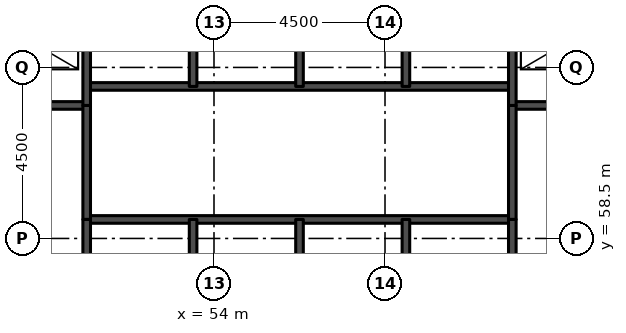
"""IFC4 building model, lengths in metres.
Left out: names, types, materials, properties, quantities, classifications, styles, units other than length and angle.
Written with IfcOpenShell. Run it as: python <this file> out.ifc"""

import sys

from ifc_helpers import new_model, si_unit, direction, frame, frame_2d, origin, place, context, subcontext, project, spatial, rectangle, extrude, element, save


model = new_model("IFC4")
c1 = context("Model", 3, precision=1e-05, world=origin(), true_north=direction((0.0, 1.0)))
c2 = subcontext(c1, "Body", "Model", "MODEL_VIEW")
j1 = project(units=[si_unit("LENGTHUNIT", "METRE"), si_unit("PLANEANGLEUNIT", "RADIAN")], contexts=[c1])
p1 = place(None, origin())
s1 = spatial("IfcSite", under=j1, at=p1, CompositionType="ELEMENT")
p2 = place(p1, origin())
s2 = spatial("IfcBuilding", under=s1, at=p2, CompositionType="ELEMENT")
p3 = place(p2, frame((0.0, 0.0, 42.9)))
s3 = spatial("IfcBuildingStorey", under=s2, at=p3, CompositionType="ELEMENT", Elevation=42.9)
p4 = place(p3, frame((50.65, 59.0, 0.0), z_axis=(0.0, 0.0, 1.0), x_axis=(1.0, 0.0, 0.0)))
e1 = element("IfcWall", 1, at=p4, inside=s3, PredefinedType="SOLIDWALL", context=c2, shape_type="SweptSolid", body=[
    extrude(rectangle(XDim=11.2, YDim=0.2, at=frame_2d((5.6, 0.0))), origin(), (0.0, 0.0, 1.0), 3.3),
])
for number, where, z_axis, x_axis in (
    (2, (45.5, 62.0, 0.0), (0.0, 0.0, 1.0), (1.0, 0.0, 0.0)),
    (3, (61.85, 62.0, 0.0), (0.0, 0.0, 1.0), (1.0, 0.0, 0.0)),
):
    element("IfcWall", number, at=place(p3, frame(where, z_axis=z_axis, x_axis=x_axis)), inside=s3, PredefinedType="SOLIDWALL", context=c2, shape_type="SweptSolid", body=[
        extrude(rectangle(XDim=5.15, YDim=0.2, at=frame_2d((2.575, 0.0))), origin(), (0.0, 0.0, 1.0), 3.08),
    ])
p5 = place(p3, frame((50.65, 62.5, 0.0), z_axis=(0.0, 0.0, 1.0), x_axis=(1.0, 0.0, 0.0)))
e4 = element("IfcWall", 4, at=p5, inside=s3, PredefinedType="SOLIDWALL", context=c2, shape_type="SweptSolid", body=[
    extrude(rectangle(XDim=11.2, YDim=0.2, at=frame_2d((5.6, 0.0))), origin(), (0.0, 0.0, 1.0), 3.3),
])
p6 = place(p3, frame((50.65, 59.0, 0.0), z_axis=(0.0, 0.0, 1.0), x_axis=(0.0, 1.0, 0.0)))
e5 = element("IfcWall", 5, at=p6, inside=s3, PredefinedType="SOLIDWALL", context=c2, shape_type="SweptSolid", body=[
    extrude(rectangle(XDim=3.0, YDim=0.2, at=frame_2d((1.5, 0.0))), origin(), (0.0, 0.0, 1.0), 3.3),
])
p7 = place(p3, frame((50.65, 56.2, 0.0), z_axis=(0.0, 0.0, 1.0), x_axis=(0.0, 1.0, 0.0)))
e6 = element("IfcWall", 6, at=p7, inside=s3, PredefinedType="SOLIDWALL", context=c2, shape_type="SweptSolid", body=[
    extrude(rectangle(XDim=2.8, YDim=0.2, at=frame_2d((1.4, 0.0))), origin(), (0.0, 0.0, 1.0), 3.08),
])
p8 = place(p3, frame((50.65, 62.0, 0.0), z_axis=(0.0, 0.0, 1.0), x_axis=(0.0, 1.0, 0.0)))
e7 = element("IfcWall", 7, at=p8, inside=s3, PredefinedType="SOLIDWALL", context=c2, shape_type="SweptSolid", body=[
    extrude(rectangle(XDim=3.3, YDim=0.2, at=frame_2d((1.65, 0.0))), origin(), (0.0, 0.0, 1.0), 3.08),
])
for number, where, z_axis, x_axis in (
    (8, (53.45, 56.2, 0.0), (0.0, 0.0, 1.0), (0.0, 1.0, 0.0)),
    (9, (53.45, 62.5, 0.0), (0.0, 0.0, 1.0), (0.0, 1.0, 0.0)),
    (10, (56.25, 56.2, 0.0), (0.0, 0.0, 1.0), (0.0, 1.0, 0.0)),
    (11, (56.25, 62.5, 0.0), (0.0, 0.0, 1.0), (0.0, 1.0, 0.0)),
    (12, (59.05, 56.2, 0.0), (0.0, 0.0, 1.0), (0.0, 1.0, 0.0)),
    (13, (59.05, 62.5, 0.0), (0.0, 0.0, 1.0), (0.0, 1.0, 0.0)),
):
    element("IfcWall", number, at=place(p3, frame(where, z_axis=z_axis, x_axis=x_axis)), inside=s3, PredefinedType="SOLIDWALL", context=c2, shape_type="SweptSolid", body=[
        extrude(rectangle(XDim=2.8, YDim=0.2, at=frame_2d((1.4, 0.0))), origin(), (0.0, 0.0, 1.0), 3.08),
    ])
p9 = place(p3, frame((61.85, 59.0, 0.0), z_axis=(0.0, 0.0, 1.0), x_axis=(0.0, 1.0, 0.0)))
e14 = element("IfcWall", 14, at=p9, inside=s3, PredefinedType="SOLIDWALL", context=c2, shape_type="SweptSolid", body=[
    extrude(rectangle(XDim=3.0, YDim=0.2, at=frame_2d((1.5, 0.0))), origin(), (0.0, 0.0, 1.0), 3.3),
])
p10 = place(p3, frame((61.85, 56.2, 0.0), z_axis=(0.0, 0.0, 1.0), x_axis=(0.0, 1.0, 0.0)))
e15 = element("IfcWall", 15, at=p10, inside=s3, PredefinedType="SOLIDWALL", context=c2, shape_type="SweptSolid", body=[
    extrude(rectangle(XDim=2.8, YDim=0.2, at=frame_2d((1.4, 0.0))), origin(), (0.0, 0.0, 1.0), 3.08),
])
p11 = place(p3, frame((61.85, 62.0, 0.0), z_axis=(0.0, 0.0, 1.0), x_axis=(0.0, 1.0, 0.0)))
e16 = element("IfcWall", 16, at=p11, inside=s3, PredefinedType="SOLIDWALL", context=c2, shape_type="SweptSolid", body=[
    extrude(rectangle(XDim=3.3, YDim=0.2, at=frame_2d((1.65, 0.0))), origin(), (0.0, 0.0, 1.0), 3.08),
])
save(model, sys.argv[1])
